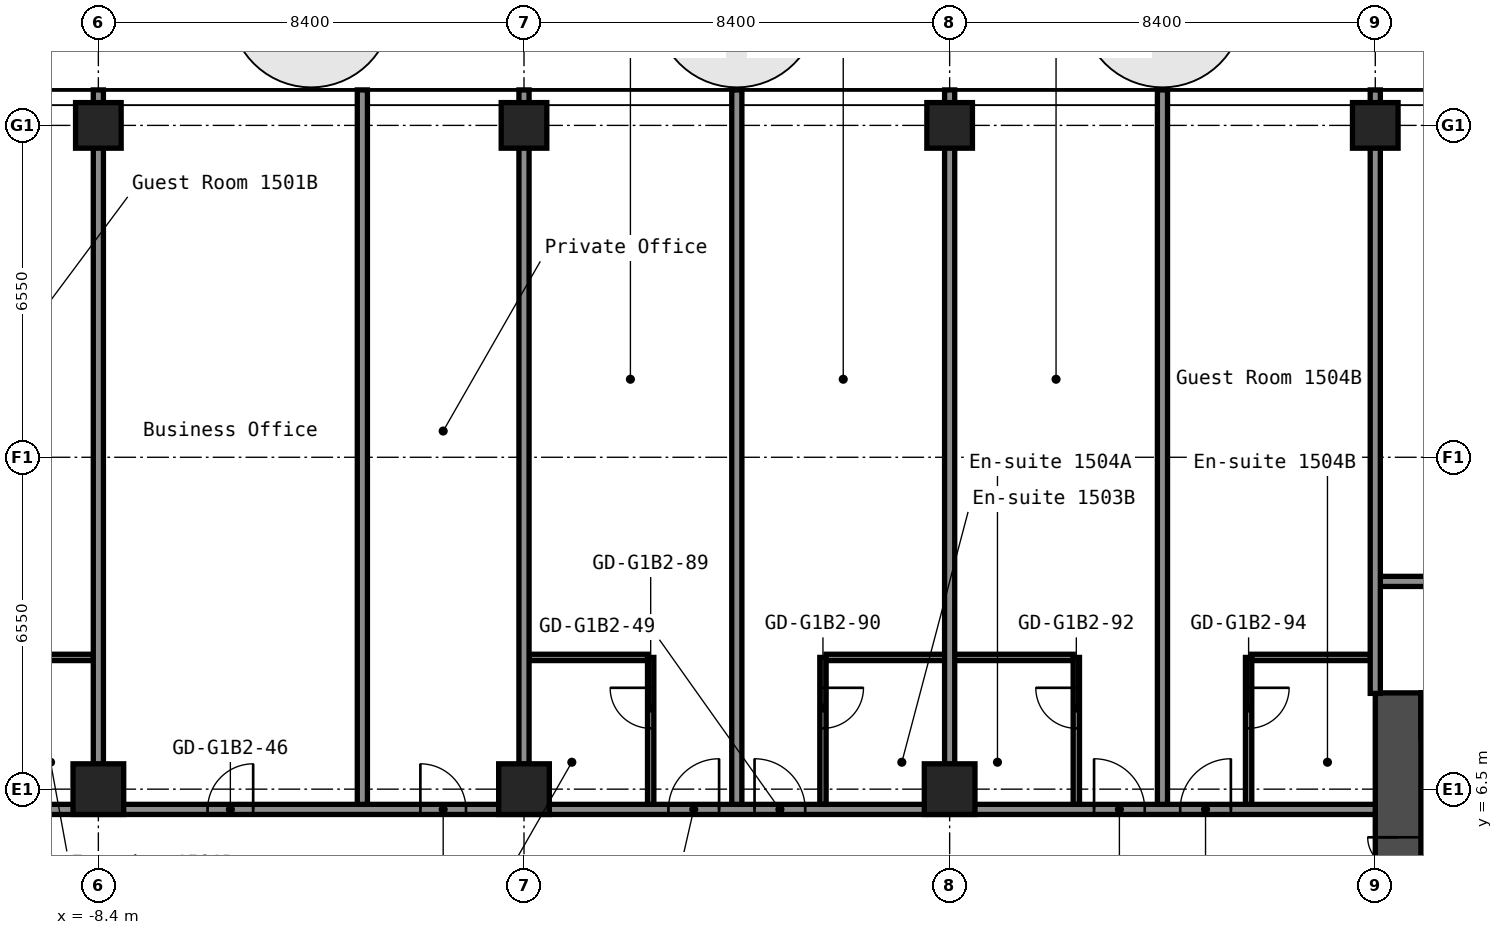
"""IFC4 building model, lengths in metres.
Left out: names, types, materials, properties, quantities, classifications, styles, units other than length and angle.
Written with IfcOpenShell. Run it as: python <this file> out.ifc"""

import sys

from ifc_helpers import new_model, si_unit, direction, frame, frame_2d, origin, origin_2d, place, context, subcontext, project, spatial, rectangle, hollow_rectangle, extrude, element, fill, save


model = new_model("IFC4")
c1 = context("Model", 3, precision=1e-05, world=origin(), true_north=direction((0.0, 1.0)))
c2 = subcontext(c1, "Body", "Model", "MODEL_VIEW")
j1 = project(units=[si_unit("LENGTHUNIT", "METRE"), si_unit("PLANEANGLEUNIT", "RADIAN")], contexts=[c1])
p1 = place(None, origin())
s1 = spatial("IfcSite", under=j1, at=p1, CompositionType="ELEMENT")
p2 = place(p1, origin())
s2 = spatial("IfcBuilding", under=s1, at=p2, CompositionType="ELEMENT")
p3 = place(p2, frame((0.0, 0.0, 55.0)))
s3 = spatial("IfcBuildingStorey", under=s2, at=p3, CompositionType="ELEMENT", Elevation=55.0)
p4 = place(p3, frame((-8.4, 6.5, 0.0), z_axis=(0.0, 0.0, 1.0), x_axis=(1.0, 0.0, 0.0)))
e1 = element("IfcColumn", 1, at=p4, inside=s3, PredefinedType="COLUMN", context=c2, shape_type="SweptSolid", body=[
    extrude(hollow_rectangle(XDim=1.0, YDim=1.0, WallThickness=0.04, at=origin_2d()), origin(), (0.0, 0.0, 1.0), 2.8),
])
p5 = place(p3, frame((-8.4, 19.6, 0.0), z_axis=(0.0, 0.0, 1.0), x_axis=(1.0, 0.0, 0.0)))
e2 = element("IfcColumn", 2, at=p5, inside=s3, PredefinedType="COLUMN", context=c2, shape_type="SweptSolid", body=[
    extrude(hollow_rectangle(XDim=0.9, YDim=0.9, WallThickness=0.036, at=origin_2d()), origin(), (0.0, 0.0, 1.0), 2.8),
])
p6 = place(p3, frame((0.0, 6.5, 0.0), z_axis=(0.0, 0.0, 1.0), x_axis=(1.0, 0.0, 0.0)))
e3 = element("IfcColumn", 3, at=p6, inside=s3, PredefinedType="COLUMN", context=c2, shape_type="SweptSolid", body=[
    extrude(hollow_rectangle(XDim=1.0, YDim=1.0, WallThickness=0.04, at=origin_2d()), origin(), (0.0, 0.0, 1.0), 2.8),
])
p7 = place(p3, frame((0.0, 19.6, 0.0), z_axis=(0.0, 0.0, 1.0), x_axis=(1.0, 0.0, 0.0)))
e4 = element("IfcColumn", 4, at=p7, inside=s3, PredefinedType="COLUMN", context=c2, shape_type="SweptSolid", body=[
    extrude(hollow_rectangle(XDim=0.9, YDim=0.9, WallThickness=0.036, at=origin_2d()), origin(), (0.0, 0.0, 1.0), 2.8),
])
p8 = place(p3, frame((8.4, 6.5, 0.0), z_axis=(0.0, 0.0, 1.0), x_axis=(1.0, 0.0, 0.0)))
e5 = element("IfcColumn", 5, at=p8, inside=s3, PredefinedType="COLUMN", context=c2, shape_type="SweptSolid", body=[
    extrude(hollow_rectangle(XDim=1.0, YDim=1.0, WallThickness=0.04, at=origin_2d()), origin(), (0.0, 0.0, 1.0), 2.8),
])
for number, where, z_axis, x_axis in (
    (6, (8.4, 19.6, 0.0), (0.0, 0.0, 1.0), (1.0, 0.0, 0.0)),
    (7, (16.8, 19.6, 0.0), (0.0, 0.0, 1.0), (1.0, 0.0, 0.0)),
):
    element("IfcColumn", number, at=place(p3, frame(where, z_axis=z_axis, x_axis=x_axis)), inside=s3, PredefinedType="COLUMN", context=c2, shape_type="SweptSolid", body=[
        extrude(hollow_rectangle(XDim=0.9, YDim=0.9, WallThickness=0.036, at=origin_2d()), origin(), (0.0, 0.0, 1.0), 2.8),
    ])
p9 = place(p3, frame((17.25, -8.4, 0.0), z_axis=(0.0, 0.0, 1.0), x_axis=(0.0, 1.0, 0.0)))
e8 = element("IfcWall", 8, at=p9, inside=s3, PredefinedType="SHEAR", context=c2, shape_type="SweptSolid", body=[
    extrude(rectangle(XDim=16.8, YDim=0.9, at=frame_2d((8.4, 0.0))), origin(), (0.0, 0.0, 1.0), 2.8),
])
p10 = place(p9, frame((12.75, 0.0, 0.0)))
e9 = element("IfcOpeningElement", 9, at=p10, cuts=e8, PredefinedType="OPENING", context=c2, shape_type="SweptSolid", body=[
    extrude(rectangle(XDim=1.2, YDim=2.1, at=frame_2d((0.6, 1.05))), frame((0.0, 0.46, 0.0), z_axis=(0.0, -1.0, 0.0), x_axis=(1.0, 0.0, 0.0)), (0.0, 0.0, 1.0), 0.92),
])
p11 = place(p9, frame((2.85, 0.0, 0.0)))
e10 = element("IfcOpeningElement", 10, at=p11, cuts=e8, PredefinedType="OPENING", context=c2, shape_type="SweptSolid", body=[
    extrude(rectangle(XDim=1.2, YDim=2.1, at=frame_2d((0.6, 1.05))), frame((0.0, 0.46, 0.0), z_axis=(0.0, -1.0, 0.0), x_axis=(1.0, 0.0, 0.0)), (0.0, 0.0, 1.0), 0.92),
])
p12 = place(p3, frame((17.7, 7.95, 0.0), z_axis=(0.0, 0.0, 1.0), x_axis=(1.0, 0.0, 0.0)))
e11 = element("IfcWall", 11, at=p12, inside=s3, PredefinedType="SHEAR", context=c2, shape_type="SweptSolid", body=[
    extrude(rectangle(XDim=15.0, YDim=0.9, at=frame_2d((7.5, 0.0))), origin(), (0.0, 0.0, 1.0), 2.8),
])
p13 = place(p12, frame((10.4, 0.0, 0.0)))
e12 = element("IfcOpeningElement", 12, at=p13, cuts=e11, PredefinedType="OPENING", context=c2, shape_type="SweptSolid", body=[
    extrude(rectangle(XDim=1.2, YDim=2.1, at=frame_2d((0.6, 1.05))), frame((0.0, 0.46, 0.0), z_axis=(0.0, -1.0, 0.0), x_axis=(1.0, 0.0, 0.0)), (0.0, 0.0, 1.0), 0.92),
])
p14 = place(p12, frame((13.35, 0.0, 0.0)))
e13 = element("IfcOpeningElement", 13, at=p14, cuts=e11, PredefinedType="OPENING", context=c2, shape_type="SweptSolid", body=[
    extrude(rectangle(XDim=0.9, YDim=2.1, at=frame_2d((0.45, 1.05))), frame((0.0, 0.46, 0.0), z_axis=(0.0, -1.0, 0.0), x_axis=(1.0, 0.0, 0.0)), (0.0, 0.0, 1.0), 0.92),
])
p15 = place(p3, frame((-16.8, 6.1, 0.0), z_axis=(0.0, 0.0, 1.0), x_axis=(1.0, 0.0, 0.0)))
e14 = element("IfcWall", 14, at=p15, inside=s3, PredefinedType="PARTITIONING", context=c2, shape_type="SweptSolid", body=[
    extrude(rectangle(XDim=33.6, YDim=0.2, at=frame_2d((16.8, 0.0))), origin(), (0.0, 0.0, 1.0), 2.8),
])
p16 = place(p15, frame((2.85, 0.0, 0.0)))
e15 = element("IfcOpeningElement", 15, at=p16, cuts=e14, PredefinedType="OPENING", context=c2, shape_type="SweptSolid", body=[
    extrude(rectangle(XDim=1.0, YDim=2.1, at=frame_2d((0.5, 1.05))), frame((0.0, 0.11, 0.0), z_axis=(0.0, -1.0, 0.0), x_axis=(1.0, 0.0, 0.0)), (0.0, 0.0, 1.0), 0.22),
])
p17 = place(p15, frame((4.55, 0.0, 0.0)))
e16 = element("IfcOpeningElement", 16, at=p17, cuts=e14, PredefinedType="OPENING", context=c2, shape_type="SweptSolid", body=[
    extrude(rectangle(XDim=1.0, YDim=2.1, at=frame_2d((0.5, 1.05))), frame((0.0, 0.11, 0.0), z_axis=(0.0, -1.0, 0.0), x_axis=(1.0, 0.0, 0.0)), (0.0, 0.0, 1.0), 0.22),
])
p18 = place(p15, frame((10.555, 0.0, 0.0)))
e17 = element("IfcOpeningElement", 17, at=p18, cuts=e14, PredefinedType="OPENING", context=c2, shape_type="SweptSolid", body=[
    extrude(rectangle(XDim=0.9, YDim=2.1, at=frame_2d((0.45, 1.05))), frame((0.0, 0.11, 0.0), z_axis=(0.0, -1.0, 0.0), x_axis=(1.0, 0.0, 0.0)), (0.0, 0.0, 1.0), 0.22),
])
p19 = place(p15, frame((14.755, 0.0, 0.0)))
e18 = element("IfcOpeningElement", 18, at=p19, cuts=e14, PredefinedType="OPENING", context=c2, shape_type="SweptSolid", body=[
    extrude(rectangle(XDim=0.9, YDim=2.1, at=frame_2d((0.45, 1.05))), frame((0.0, 0.11, 0.0), z_axis=(0.0, -1.0, 0.0), x_axis=(1.0, 0.0, 0.0)), (0.0, 0.0, 1.0), 0.22),
])
p20 = place(p15, frame((19.65, 0.0, 0.0)))
e19 = element("IfcOpeningElement", 19, at=p20, cuts=e14, PredefinedType="OPENING", context=c2, shape_type="SweptSolid", body=[
    extrude(rectangle(XDim=1.0, YDim=2.1, at=frame_2d((0.5, 1.05))), frame((0.0, 0.11, 0.0), z_axis=(0.0, -1.0, 0.0), x_axis=(1.0, 0.0, 0.0)), (0.0, 0.0, 1.0), 0.22),
])
p21 = place(p15, frame((21.35, 0.0, 0.0)))
e20 = element("IfcOpeningElement", 20, at=p21, cuts=e14, PredefinedType="OPENING", context=c2, shape_type="SweptSolid", body=[
    extrude(rectangle(XDim=1.0, YDim=2.1, at=frame_2d((0.5, 1.05))), frame((0.0, 0.11, 0.0), z_axis=(0.0, -1.0, 0.0), x_axis=(1.0, 0.0, 0.0)), (0.0, 0.0, 1.0), 0.22),
])
p22 = place(p15, frame((28.05, 0.0, 0.0)))
e21 = element("IfcOpeningElement", 21, at=p22, cuts=e14, PredefinedType="OPENING", context=c2, shape_type="SweptSolid", body=[
    extrude(rectangle(XDim=1.0, YDim=2.1, at=frame_2d((0.5, 1.05))), frame((0.0, 0.11, 0.0), z_axis=(0.0, -1.0, 0.0), x_axis=(1.0, 0.0, 0.0)), (0.0, 0.0, 1.0), 0.22),
])
p23 = place(p15, frame((29.75, 0.0, 0.0)))
e22 = element("IfcOpeningElement", 22, at=p23, cuts=e14, PredefinedType="OPENING", context=c2, shape_type="SweptSolid", body=[
    extrude(rectangle(XDim=1.0, YDim=2.1, at=frame_2d((0.5, 1.05))), frame((0.0, 0.11, 0.0), z_axis=(0.0, -1.0, 0.0), x_axis=(1.0, 0.0, 0.0)), (0.0, 0.0, 1.0), 0.22),
])
for number, where, z_axis, x_axis in (
    (23, (-10.837, 9.1, 0.0), (0.0, 0.0, 1.0), (1.0, 0.0, 0.0)),
    (24, (0.1, 9.1, 0.0), (0.0, 0.0, 1.0), (1.0, 0.0, 0.0)),
):
    element("IfcWall", number, at=place(p3, frame(where, z_axis=z_axis, x_axis=x_axis)), inside=s3, PredefinedType="PARTITIONING", context=c2, shape_type="SweptSolid", body=[
        extrude(rectangle(XDim=2.337, YDim=0.125, at=frame_2d((1.169, 0.0))), origin(), (0.0, 0.0, 1.0), 2.8),
    ])
p24 = place(p3, frame((5.962, 9.1, 0.0), z_axis=(0.0, 0.0, 1.0), x_axis=(1.0, 0.0, 0.0)))
e25 = element("IfcWall", 25, at=p24, inside=s3, PredefinedType="PARTITIONING", context=c2, shape_type="SweptSolid", body=[
    extrude(rectangle(XDim=4.875, YDim=0.125, at=frame_2d((2.438, 0.0))), origin(), (0.0, 0.0, 1.0), 2.8),
])
p25 = place(p3, frame((14.363, 9.1, 0.0), z_axis=(0.0, 0.0, 1.0), x_axis=(1.0, 0.0, 0.0)))
e26 = element("IfcWall", 26, at=p25, inside=s3, PredefinedType="PARTITIONING", context=c2, shape_type="SweptSolid", body=[
    extrude(rectangle(XDim=2.337, YDim=0.125, at=frame_2d((1.169, 0.0))), origin(), (0.0, 0.0, 1.0), 2.8),
])
p26 = place(p3, frame((16.8, 10.6, 0.0), z_axis=(0.0, 0.0, 1.0), x_axis=(1.0, 0.0, 0.0)))
e27 = element("IfcWall", 27, at=p26, inside=s3, PredefinedType="PARTITIONING", context=c2, shape_type="SweptSolid", body=[
    extrude(rectangle(XDim=34.3, YDim=0.2, at=frame_2d((17.15, 0.0))), origin(), (0.0, 0.0, 1.0), 2.8),
])
p27 = place(p26, frame((3.4, 0.0, 0.0)))
e28 = element("IfcOpeningElement", 28, at=p27, cuts=e27, PredefinedType="OPENING", context=c2, shape_type="SweptSolid", body=[
    extrude(rectangle(XDim=1.6, YDim=2.1, at=frame_2d((0.8, 1.05))), frame((0.0, 0.11, 0.0), z_axis=(0.0, -1.0, 0.0), x_axis=(1.0, 0.0, 0.0)), (0.0, 0.0, 1.0), 0.22),
])
p28 = place(p26, frame((11.8, 0.0, 0.0)))
e29 = element("IfcOpeningElement", 29, at=p28, cuts=e27, PredefinedType="OPENING", context=c2, shape_type="SweptSolid", body=[
    extrude(rectangle(XDim=1.6, YDim=2.1, at=frame_2d((0.8, 1.05))), frame((0.0, 0.11, 0.0), z_axis=(0.0, -1.0, 0.0), x_axis=(1.0, 0.0, 0.0)), (0.0, 0.0, 1.0), 0.22),
])
p29 = place(p26, frame((20.2, 0.0, 0.0)))
e30 = element("IfcOpeningElement", 30, at=p29, cuts=e27, PredefinedType="OPENING", context=c2, shape_type="SweptSolid", body=[
    extrude(rectangle(XDim=1.6, YDim=2.1, at=frame_2d((0.8, 1.05))), frame((0.0, 0.11, 0.0), z_axis=(0.0, -1.0, 0.0), x_axis=(1.0, 0.0, 0.0)), (0.0, 0.0, 1.0), 0.22),
])
p30 = place(p26, frame((28.8, 0.0, 0.0)))
e31 = element("IfcOpeningElement", 31, at=p30, cuts=e27, PredefinedType="OPENING", context=c2, shape_type="SweptSolid", body=[
    extrude(rectangle(XDim=1.6, YDim=2.1, at=frame_2d((0.8, 1.05))), frame((0.0, 0.11, 0.0), z_axis=(0.0, -1.0, 0.0), x_axis=(1.0, 0.0, 0.0)), (0.0, 0.0, 1.0), 0.22),
])
p31 = place(p3, frame((-8.4, 6.99, 0.0), z_axis=(0.0, 0.0, 1.0), x_axis=(0.0, 1.0, 0.0)))
e32 = element("IfcWall", 32, at=p31, inside=s3, PredefinedType="PARTITIONING", context=c2, shape_type="SweptSolid", body=[
    extrude(rectangle(XDim=13.31, YDim=0.2, at=frame_2d((6.655, 0.0))), origin(), (0.0, 0.0, 1.0), 2.8),
])
p32 = place(p3, frame((-3.19, 6.2, 0.0), z_axis=(0.0, 0.0, 1.0), x_axis=(0.0, 1.0, 0.0)))
e33 = element("IfcWall", 33, at=p32, inside=s3, PredefinedType="PARTITIONING", context=c2, shape_type="SweptSolid", body=[
    extrude(rectangle(XDim=14.1, YDim=0.2, at=frame_2d((7.05, 0.0))), origin(), (0.0, 0.0, 1.0), 2.8),
])
p33 = place(p3, frame((0.0, 6.99, 0.0), z_axis=(0.0, 0.0, 1.0), x_axis=(0.0, 1.0, 0.0)))
e34 = element("IfcWall", 34, at=p33, inside=s3, PredefinedType="PARTITIONING", context=c2, shape_type="SweptSolid", body=[
    extrude(rectangle(XDim=13.31, YDim=0.2, at=frame_2d((6.655, 0.0))), origin(), (0.0, 0.0, 1.0), 2.8),
])
p34 = place(p3, frame((2.5, 6.2, 0.0), z_axis=(0.0, 0.0, 1.0), x_axis=(0.0, 1.0, 0.0)))
e35 = element("IfcWall", 35, at=p34, inside=s3, PredefinedType="PARTITIONING", context=c2, shape_type="SweptSolid", body=[
    extrude(rectangle(XDim=2.9, YDim=0.125, at=frame_2d((1.45, 0.0))), origin(), (0.0, 0.0, 1.0), 2.8),
])
p35 = place(p34, frame((1.5, 0.0, 0.0)))
e36 = element("IfcOpeningElement", 36, at=p35, cuts=e35, PredefinedType="OPENING", context=c2, shape_type="SweptSolid", body=[
    extrude(rectangle(XDim=0.8, YDim=2.1, at=frame_2d((0.4, 1.05))), frame((0.0, 0.073, 0.0), z_axis=(0.0, -1.0, 0.0), x_axis=(1.0, 0.0, 0.0)), (0.0, 0.0, 1.0), 0.145),
])
p36 = place(p3, frame((4.2, 6.2, 0.0), z_axis=(0.0, 0.0, 1.0), x_axis=(0.0, 1.0, 0.0)))
e37 = element("IfcWall", 37, at=p36, inside=s3, PredefinedType="PARTITIONING", context=c2, shape_type="SweptSolid", body=[
    extrude(rectangle(XDim=14.1, YDim=0.2, at=frame_2d((7.05, 0.0))), origin(), (0.0, 0.0, 1.0), 2.8),
])
p37 = place(p3, frame((5.9, 6.2, 0.0), z_axis=(0.0, 0.0, 1.0), x_axis=(0.0, 1.0, 0.0)))
e38 = element("IfcWall", 38, at=p37, inside=s3, PredefinedType="PARTITIONING", context=c2, shape_type="SweptSolid", body=[
    extrude(rectangle(XDim=2.9, YDim=0.125, at=frame_2d((1.45, 0.0))), origin(), (0.0, 0.0, 1.0), 2.8),
])
p38 = place(p37, frame((1.5, 0.0, 0.0)))
e39 = element("IfcOpeningElement", 39, at=p38, cuts=e38, PredefinedType="OPENING", context=c2, shape_type="SweptSolid", body=[
    extrude(rectangle(XDim=0.8, YDim=2.1, at=frame_2d((0.4, 1.05))), frame((0.0, 0.073, 0.0), z_axis=(0.0, -1.0, 0.0), x_axis=(1.0, 0.0, 0.0)), (0.0, 0.0, 1.0), 0.145),
])
p39 = place(p3, frame((8.4, 6.99, 0.0), z_axis=(0.0, 0.0, 1.0), x_axis=(0.0, 1.0, 0.0)))
e40 = element("IfcWall", 40, at=p39, inside=s3, PredefinedType="PARTITIONING", context=c2, shape_type="SweptSolid", body=[
    extrude(rectangle(XDim=13.31, YDim=0.2, at=frame_2d((6.655, 0.0))), origin(), (0.0, 0.0, 1.0), 2.8),
])
p40 = place(p3, frame((10.9, 6.2, 0.0), z_axis=(0.0, 0.0, 1.0), x_axis=(0.0, 1.0, 0.0)))
e41 = element("IfcWall", 41, at=p40, inside=s3, PredefinedType="PARTITIONING", context=c2, shape_type="SweptSolid", body=[
    extrude(rectangle(XDim=2.9, YDim=0.125, at=frame_2d((1.45, 0.0))), origin(), (0.0, 0.0, 1.0), 2.8),
])
p41 = place(p40, frame((1.5, 0.0, 0.0)))
e42 = element("IfcOpeningElement", 42, at=p41, cuts=e41, PredefinedType="OPENING", context=c2, shape_type="SweptSolid", body=[
    extrude(rectangle(XDim=0.8, YDim=2.1, at=frame_2d((0.4, 1.05))), frame((0.0, 0.073, 0.0), z_axis=(0.0, -1.0, 0.0), x_axis=(1.0, 0.0, 0.0)), (0.0, 0.0, 1.0), 0.145),
])
p42 = place(p3, frame((12.6, 6.2, 0.0), z_axis=(0.0, 0.0, 1.0), x_axis=(0.0, 1.0, 0.0)))
e43 = element("IfcWall", 43, at=p42, inside=s3, PredefinedType="PARTITIONING", context=c2, shape_type="SweptSolid", body=[
    extrude(rectangle(XDim=14.1, YDim=0.2, at=frame_2d((7.05, 0.0))), origin(), (0.0, 0.0, 1.0), 2.8),
])
p43 = place(p3, frame((14.3, 6.2, 0.0), z_axis=(0.0, 0.0, 1.0), x_axis=(0.0, 1.0, 0.0)))
e44 = element("IfcWall", 44, at=p43, inside=s3, PredefinedType="PARTITIONING", context=c2, shape_type="SweptSolid", body=[
    extrude(rectangle(XDim=2.9, YDim=0.125, at=frame_2d((1.45, 0.0))), origin(), (0.0, 0.0, 1.0), 2.8),
])
p44 = place(p43, frame((1.5, 0.0, 0.0)))
e45 = element("IfcOpeningElement", 45, at=p44, cuts=e44, PredefinedType="OPENING", context=c2, shape_type="SweptSolid", body=[
    extrude(rectangle(XDim=0.8, YDim=2.1, at=frame_2d((0.4, 1.05))), frame((0.0, 0.073, 0.0), z_axis=(0.0, -1.0, 0.0), x_axis=(1.0, 0.0, 0.0)), (0.0, 0.0, 1.0), 0.145),
])
p45 = place(p3, frame((16.8, 8.39, 0.0), z_axis=(0.0, 0.0, 1.0), x_axis=(0.0, 1.0, 0.0)))
e46 = element("IfcWall", 46, at=p45, inside=s3, PredefinedType="PARTITIONING", context=c2, shape_type="SweptSolid", body=[
    extrude(rectangle(XDim=11.91, YDim=0.2, at=frame_2d((5.955, 0.0))), origin(), (0.0, 0.0, 1.0), 2.8),
])
p46 = place(p10, origin())
e47 = element("IfcDoor", 47, at=p46, inside=s3, OperationType="DOUBLE_DOOR_SINGLE_SWING", PredefinedType="DOOR", context=c2, shape_type="SweptSolid", body=[
    extrude(rectangle(XDim=1.2, YDim=2.1, at=frame_2d((0.6, 1.05))), frame((0.0, 0.025, 0.0), z_axis=(0.0, -1.0, 0.0), x_axis=(1.0, 0.0, 0.0)), (0.0, 0.0, 1.0), 0.05),
])
fill(e9, e47)
p47 = place(p18, origin())
e48 = element("IfcDoor", 48, at=p47, inside=s3, OperationType="SINGLE_SWING_LEFT", PredefinedType="DOOR", context=c2, shape_type="SweptSolid", body=[
    extrude(rectangle(XDim=0.9, YDim=2.1, at=frame_2d((0.45, 1.05))), frame((0.0, 0.025, 0.0), z_axis=(0.0, -1.0, 0.0), x_axis=(1.0, 0.0, 0.0)), (0.0, 0.0, 1.0), 0.05),
])
fill(e17, e48)
p48 = place(p19, origin())
e49 = element("IfcDoor", 49, at=p48, inside=s3, OperationType="SINGLE_SWING_RIGHT", PredefinedType="DOOR", context=c2, shape_type="SweptSolid", body=[
    extrude(rectangle(XDim=0.9, YDim=2.1, at=frame_2d((0.45, 1.05))), frame((0.0, 0.025, 0.0), z_axis=(0.0, -1.0, 0.0), x_axis=(1.0, 0.0, 0.0)), (0.0, 0.0, 1.0), 0.05),
])
fill(e18, e49)
p49 = place(p20, origin())
e50 = element("IfcDoor", 50, at=p49, inside=s3, OperationType="SINGLE_SWING_LEFT", PredefinedType="DOOR", context=c2, shape_type="SweptSolid", body=[
    extrude(rectangle(XDim=1.0, YDim=2.1, at=frame_2d((0.5, 1.05))), frame((0.0, 0.025, 0.0), z_axis=(0.0, -1.0, 0.0), x_axis=(1.0, 0.0, 0.0)), (0.0, 0.0, 1.0), 0.05),
])
fill(e19, e50)
p50 = place(p21, origin())
e51 = element("IfcDoor", 51, at=p50, inside=s3, OperationType="SINGLE_SWING_RIGHT", PredefinedType="DOOR", context=c2, shape_type="SweptSolid", body=[
    extrude(rectangle(XDim=1.0, YDim=2.1, at=frame_2d((0.5, 1.05))), frame((0.0, 0.025, 0.0), z_axis=(0.0, -1.0, 0.0), x_axis=(1.0, 0.0, 0.0)), (0.0, 0.0, 1.0), 0.05),
])
fill(e20, e51)
p51 = place(p22, origin())
e52 = element("IfcDoor", 52, at=p51, inside=s3, OperationType="SINGLE_SWING_RIGHT", PredefinedType="DOOR", context=c2, shape_type="SweptSolid", body=[
    extrude(rectangle(XDim=1.0, YDim=2.1, at=frame_2d((0.5, 1.05))), frame((0.0, 0.025, 0.0), z_axis=(0.0, -1.0, 0.0), x_axis=(1.0, 0.0, 0.0)), (0.0, 0.0, 1.0), 0.05),
])
fill(e21, e52)
p52 = place(p23, origin())
e53 = element("IfcDoor", 53, at=p52, inside=s3, OperationType="SINGLE_SWING_LEFT", PredefinedType="DOOR", context=c2, shape_type="SweptSolid", body=[
    extrude(rectangle(XDim=1.0, YDim=2.1, at=frame_2d((0.5, 1.05))), frame((0.0, 0.025, 0.0), z_axis=(0.0, -1.0, 0.0), x_axis=(1.0, 0.0, 0.0)), (0.0, 0.0, 1.0), 0.05),
])
fill(e22, e53)
p53 = place(p35, origin())
e54 = element("IfcDoor", 54, at=p53, inside=s3, OperationType="SINGLE_SWING_LEFT", PredefinedType="DOOR", context=c2, shape_type="SweptSolid", body=[
    extrude(rectangle(XDim=0.8, YDim=2.1, at=frame_2d((0.4, 1.05))), frame((0.0, 0.025, 0.0), z_axis=(0.0, -1.0, 0.0), x_axis=(1.0, 0.0, 0.0)), (0.0, 0.0, 1.0), 0.05),
])
fill(e36, e54)
p54 = place(p38, origin())
e55 = element("IfcDoor", 55, at=p54, inside=s3, OperationType="SINGLE_SWING_RIGHT", PredefinedType="DOOR", context=c2, shape_type="SweptSolid", body=[
    extrude(rectangle(XDim=0.8, YDim=2.1, at=frame_2d((0.4, 1.05))), frame((0.0, 0.025, 0.0), z_axis=(0.0, -1.0, 0.0), x_axis=(1.0, 0.0, 0.0)), (0.0, 0.0, 1.0), 0.05),
])
fill(e39, e55)
p55 = place(p41, origin())
e56 = element("IfcDoor", 56, at=p55, inside=s3, OperationType="SINGLE_SWING_LEFT", PredefinedType="DOOR", context=c2, shape_type="SweptSolid", body=[
    extrude(rectangle(XDim=0.8, YDim=2.1, at=frame_2d((0.4, 1.05))), frame((0.0, 0.025, 0.0), z_axis=(0.0, -1.0, 0.0), x_axis=(1.0, 0.0, 0.0)), (0.0, 0.0, 1.0), 0.05),
])
fill(e42, e56)
p56 = place(p44, origin())
e57 = element("IfcDoor", 57, at=p56, inside=s3, OperationType="SINGLE_SWING_RIGHT", PredefinedType="DOOR", context=c2, shape_type="SweptSolid", body=[
    extrude(rectangle(XDim=0.8, YDim=2.1, at=frame_2d((0.4, 1.05))), frame((0.0, 0.025, 0.0), z_axis=(0.0, -1.0, 0.0), x_axis=(1.0, 0.0, 0.0)), (0.0, 0.0, 1.0), 0.05),
])
fill(e45, e57)
save(model, sys.argv[1])
